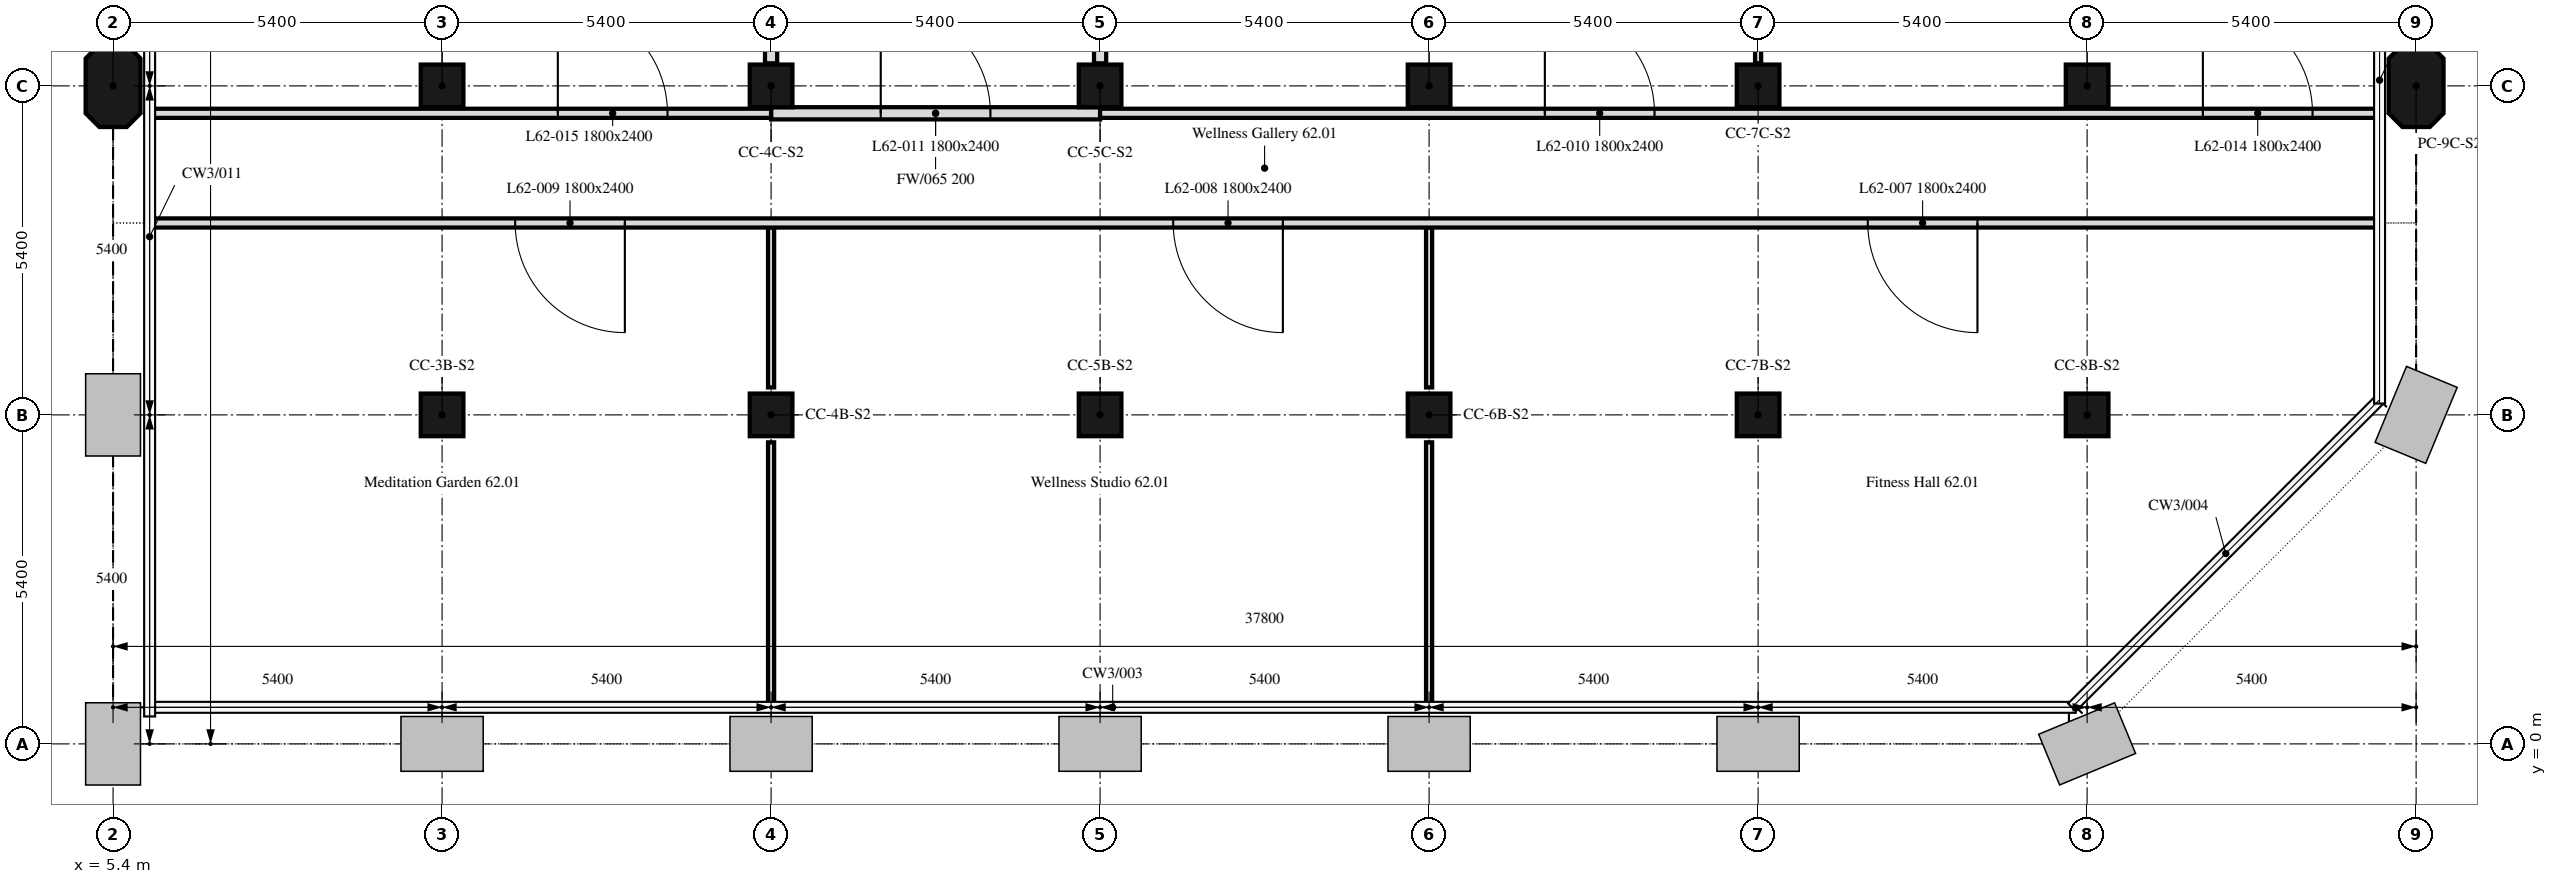
"""IFC4 building model, lengths in metres.
Left out: names, types, materials, properties, quantities, classifications, styles, units other than length and angle.
Written with IfcOpenShell. Run it as: python <this file> out.ifc"""

import sys

from ifc_helpers import new_model, si_unit, direction, frame, frame_2d, origin, origin_2d, place, context, subcontext, project, spatial, polyline, rectangle, outline, extrude, element, fill, save


model = new_model("IFC4")
c1 = context("Model", 3, precision=1e-05, world=origin(), true_north=direction((0.0, 1.0)))
c2 = subcontext(c1, "Body", "Model", "MODEL_VIEW")
j1 = project(units=[si_unit("LENGTHUNIT", "METRE"), si_unit("PLANEANGLEUNIT", "RADIAN")], contexts=[c1])
p1 = place(None, origin())
s1 = spatial("IfcSite", under=j1, at=p1, CompositionType="ELEMENT")
p2 = place(p1, origin())
s2 = spatial("IfcBuilding", under=s1, at=p2, CompositionType="ELEMENT")
p3 = place(p2, frame((0.0, 0.0, 255.7)))
s3 = spatial("IfcBuildingStorey", under=s2, at=p3, CompositionType="ELEMENT", Elevation=255.7)
for number, where, z_axis, x_axis in (
    (1, (10.8, 5.4, 0.0), (0.0, 0.0, 1.0), (1.0, 0.0, 0.0)),
    (2, (16.2, 5.4, 0.0), (0.0, 0.0, 1.0), (1.0, 0.0, 0.0)),
    (3, (21.6, 5.4, 0.0), (0.0, 0.0, 1.0), (1.0, 0.0, 0.0)),
    (4, (27.0, 5.4, 0.0), (0.0, 0.0, 1.0), (1.0, 0.0, 0.0)),
    (5, (32.4, 5.4, 0.0), (0.0, 0.0, 1.0), (1.0, 0.0, 0.0)),
    (6, (37.8, 5.4, 0.0), (0.0, 0.0, 1.0), (1.0, 0.0, 0.0)),
):
    element("IfcColumn", number, at=place(p3, frame(where, z_axis=z_axis, x_axis=x_axis)), inside=s3, PredefinedType="COLUMN", context=c2, shape_type="SweptSolid", body=[
        extrude(rectangle(XDim=0.7, YDim=0.7, at=origin_2d()), origin(), (0.0, 0.0, 1.0), 4.5),
    ])
p4 = place(p3, frame((5.4, 10.8, 0.0), z_axis=(0.0, 0.0, 1.0), x_axis=(0.0, 1.0, 0.0)))
e7 = element("IfcColumn", 7, at=p4, inside=s3, PredefinedType="COLUMN", context=c2, shape_type="SweptSolid", body=[
    extrude(outline(polyline([(-0.45, -0.45), (0.45, -0.45), (0.675, -0.225), (0.675, 0.225), (0.45, 0.45), (-0.45, 0.45), (-0.675, 0.225), (-0.675, -0.225), (-0.45, -0.45)])), origin(), (0.0, 0.0, 1.0), 4.5),
])
for number, where, z_axis, x_axis in (
    (8, (10.8, 10.8, 0.0), (0.0, 0.0, 1.0), (1.0, 0.0, 0.0)),
    (9, (16.2, 10.8, 0.0), (0.0, 0.0, 1.0), (1.0, 0.0, 0.0)),
    (10, (21.6, 10.8, 0.0), (0.0, 0.0, 1.0), (1.0, 0.0, 0.0)),
    (11, (27.0, 10.8, 0.0), (0.0, 0.0, 1.0), (1.0, 0.0, 0.0)),
    (12, (32.4, 10.8, 0.0), (0.0, 0.0, 1.0), (1.0, 0.0, 0.0)),
    (13, (37.8, 10.8, 0.0), (0.0, 0.0, 1.0), (1.0, 0.0, 0.0)),
):
    element("IfcColumn", number, at=place(p3, frame(where, z_axis=z_axis, x_axis=x_axis)), inside=s3, PredefinedType="COLUMN", context=c2, shape_type="SweptSolid", body=[
        extrude(rectangle(XDim=0.7, YDim=0.7, at=origin_2d()), origin(), (0.0, 0.0, 1.0), 4.5),
    ])
p5 = place(p3, frame((43.2, 10.8, 0.0), z_axis=(0.0, 0.0, 1.0), x_axis=(0.0, 1.0, 0.0)))
e14 = element("IfcColumn", 14, at=p5, inside=s3, PredefinedType="COLUMN", context=c2, shape_type="SweptSolid", body=[
    extrude(outline(polyline([(-0.45, -0.45), (0.45, -0.45), (0.675, -0.225), (0.675, 0.225), (0.45, 0.45), (-0.45, 0.45), (-0.675, 0.225), (-0.675, -0.225), (-0.45, -0.45)])), origin(), (0.0, 0.0, 1.0), 4.5),
])
p6 = place(p3, frame((27.0, 8.475, 0.0), z_axis=(0.0, 0.0, 1.0), x_axis=(0.0, -1.0, 0.0)))
e15 = element("IfcWall", 15, at=p6, inside=s3, PredefinedType="PARTITIONING", context=c2, shape_type="SweptSolid", body=[
    extrude(rectangle(XDim=2.625, YDim=0.1, at=frame_2d((1.312, 0.0))), origin(), (0.0, 0.0, 1.0), 3.75),
])
p7 = place(p3, frame((27.0, 4.949, 0.0), z_axis=(0.0, 0.0, 1.0), x_axis=(0.0, -1.0, 0.0)))
e16 = element("IfcWall", 16, at=p7, inside=s3, PredefinedType="PARTITIONING", context=c2, shape_type="SweptSolid", body=[
    extrude(rectangle(XDim=4.349, YDim=0.1, at=frame_2d((2.175, 0.0))), origin(), (0.0, 0.0, 1.0), 3.75),
])
p8 = place(p3, frame((16.2, 8.475, 0.0), z_axis=(0.0, 0.0, 1.0), x_axis=(0.0, -1.0, 0.0)))
e17 = element("IfcWall", 17, at=p8, inside=s3, PredefinedType="PARTITIONING", context=c2, shape_type="SweptSolid", body=[
    extrude(rectangle(XDim=2.625, YDim=0.1, at=frame_2d((1.312, 0.0))), origin(), (0.0, 0.0, 1.0), 3.75),
])
p9 = place(p3, frame((16.2, 4.949, 0.0), z_axis=(0.0, 0.0, 1.0), x_axis=(0.0, -1.0, 0.0)))
e18 = element("IfcWall", 18, at=p9, inside=s3, PredefinedType="PARTITIONING", context=c2, shape_type="SweptSolid", body=[
    extrude(rectangle(XDim=4.349, YDim=0.1, at=frame_2d((2.175, 0.0))), origin(), (0.0, 0.0, 1.0), 3.75),
])
p10 = place(p3, frame((42.6, 8.55, 0.0), z_axis=(0.0, 0.0, 1.0), x_axis=(-1.0, 0.0, 0.0)))
e19 = element("IfcWall", 19, at=p10, inside=s3, PredefinedType="PARTITIONING", context=c2, shape_type="SweptSolid", body=[
    extrude(rectangle(XDim=36.6, YDim=0.15, at=frame_2d((18.3, 0.0))), origin(), (0.0, 0.0, 1.0), 3.75),
])
p11 = place(p10, frame((6.6, 0.0, 0.0)))
e20 = element("IfcOpeningElement", 20, at=p11, cuts=e19, PredefinedType="OPENING", context=c2, shape_type="SweptSolid", body=[
    extrude(rectangle(XDim=1.8, YDim=2.4, at=frame_2d((0.9, 1.2))), frame((0.0, 0.075, 0.0), z_axis=(0.0, -1.0, 0.0), x_axis=(1.0, 0.0, 0.0)), (0.0, 0.0, 1.0), 0.15),
])
p12 = place(p10, frame((18.0, 0.0, 0.0)))
e21 = element("IfcOpeningElement", 21, at=p12, cuts=e19, PredefinedType="OPENING", context=c2, shape_type="SweptSolid", body=[
    extrude(rectangle(XDim=1.8, YDim=2.4, at=frame_2d((0.9, 1.2))), frame((0.0, 0.075, 0.0), z_axis=(0.0, -1.0, 0.0), x_axis=(1.0, 0.0, 0.0)), (0.0, 0.0, 1.0), 0.15),
])
p13 = place(p10, frame((28.8, 0.0, 0.0)))
e22 = element("IfcOpeningElement", 22, at=p13, cuts=e19, PredefinedType="OPENING", context=c2, shape_type="SweptSolid", body=[
    extrude(rectangle(XDim=1.8, YDim=2.4, at=frame_2d((0.9, 1.2))), frame((0.0, 0.075, 0.0), z_axis=(0.0, -1.0, 0.0), x_axis=(1.0, 0.0, 0.0)), (0.0, 0.0, 1.0), 0.15),
])
p14 = place(p3, frame((32.4, 11.17, 0.0), z_axis=(0.0, 0.0, 1.0), x_axis=(0.0, 1.0, 0.0)))
e23 = element("IfcWall", 23, at=p14, inside=s3, PredefinedType="PARTITIONING", context=c2, shape_type="SweptSolid", body=[
    extrude(rectangle(XDim=5.03, YDim=0.1, at=frame_2d((2.515, 0.0))), origin(), (0.0, 0.0, 1.0), 3.75),
])
p15 = place(p3, frame((21.6, 15.78, 0.0), z_axis=(0.0, 0.0, 1.0), x_axis=(0.0, -1.0, 0.0)))
e24 = element("IfcWall", 24, at=p15, inside=s3, PredefinedType="PARTITIONING", context=c2, shape_type="SweptSolid", body=[
    extrude(rectangle(XDim=4.61, YDim=0.2, at=frame_2d((2.305, 0.0))), origin(), (0.0, 0.0, 1.0), 3.75),
])
p16 = place(p3, frame((16.2, 10.35, 0.0), z_axis=(0.0, 0.0, 1.0), x_axis=(1.0, 0.0, 0.0)))
e25 = element("IfcWall", 25, at=p16, inside=s3, PredefinedType="PARTITIONING", context=c2, shape_type="SweptSolid", body=[
    extrude(rectangle(XDim=5.4, YDim=0.2, at=frame_2d((2.7, 0.0))), origin(), (0.0, 0.0, 1.0), 4.5),
])
p17 = place(p16, frame((1.8, 0.0, 0.0)))
e26 = element("IfcOpeningElement", 26, at=p17, cuts=e25, PredefinedType="OPENING", context=c2, shape_type="SweptSolid", body=[
    extrude(rectangle(XDim=1.8, YDim=2.4, at=frame_2d((0.9, 1.2))), frame((0.0, 0.1, 0.0), z_axis=(0.0, -1.0, 0.0), x_axis=(1.0, 0.0, 0.0)), (0.0, 0.0, 1.0), 0.2),
])
p18 = place(p3, frame((16.2, 16.2, 0.0), z_axis=(0.0, 0.0, 1.0), x_axis=(0.0, -1.0, 0.0)))
e27 = element("IfcWall", 27, at=p18, inside=s3, PredefinedType="PARTITIONING", context=c2, shape_type="SweptSolid", body=[
    extrude(rectangle(XDim=5.03, YDim=0.2, at=frame_2d((2.515, 0.0))), origin(), (0.0, 0.0, 1.0), 3.75),
])
p19 = place(p3, frame((21.6, 10.35, 0.0), z_axis=(0.0, 0.0, 1.0), x_axis=(1.0, 0.0, 0.0)))
e28 = element("IfcWall", 28, at=p19, inside=s3, PredefinedType="PARTITIONING", context=c2, shape_type="SweptSolid", body=[
    extrude(rectangle(XDim=21.0, YDim=0.15, at=frame_2d((10.5, 0.0))), origin(), (0.0, 0.0, 1.0), 3.75),
])
p20 = place(p19, frame((7.3, 0.0, 0.0)))
e29 = element("IfcOpeningElement", 29, at=p20, cuts=e28, PredefinedType="OPENING", context=c2, shape_type="SweptSolid", body=[
    extrude(rectangle(XDim=1.8, YDim=2.4, at=frame_2d((0.9, 1.2))), frame((0.0, 0.075, 0.0), z_axis=(0.0, -1.0, 0.0), x_axis=(1.0, 0.0, 0.0)), (0.0, 0.0, 1.0), 0.15),
])
p21 = place(p19, frame((18.1, 0.0, 0.0)))
e30 = element("IfcOpeningElement", 30, at=p21, cuts=e28, PredefinedType="OPENING", context=c2, shape_type="SweptSolid", body=[
    extrude(rectangle(XDim=1.8, YDim=2.4, at=frame_2d((0.9, 1.2))), frame((0.0, 0.075, 0.0), z_axis=(0.0, -1.0, 0.0), x_axis=(1.0, 0.0, 0.0)), (0.0, 0.0, 1.0), 0.15),
])
p22 = place(p3, frame((6.0, 10.35, 0.0), z_axis=(0.0, 0.0, 1.0), x_axis=(1.0, 0.0, 0.0)))
e31 = element("IfcWall", 31, at=p22, inside=s3, PredefinedType="PARTITIONING", context=c2, shape_type="SweptSolid", body=[
    extrude(rectangle(XDim=10.2, YDim=0.15, at=frame_2d((5.1, 0.0))), origin(), (0.0, 0.0, 1.0), 3.75),
])
p23 = place(p22, frame((6.7, 0.0, 0.0)))
e32 = element("IfcOpeningElement", 32, at=p23, cuts=e31, PredefinedType="OPENING", context=c2, shape_type="SweptSolid", body=[
    extrude(rectangle(XDim=1.8, YDim=2.4, at=frame_2d((0.9, 1.2))), frame((0.0, 0.075, 0.0), z_axis=(0.0, -1.0, 0.0), x_axis=(1.0, 0.0, 0.0)), (0.0, 0.0, 1.0), 0.15),
])
p24 = place(p11, origin())
e33 = element("IfcDoor", 33, at=p24, inside=s3, OperationType="DOUBLE_DOOR_SINGLE_SWING", PredefinedType="DOOR", context=c2, shape_type="SweptSolid", body=[
    extrude(rectangle(XDim=1.8, YDim=2.4, at=frame_2d((0.9, 1.2))), frame((0.0, 0.025, 0.0), z_axis=(0.0, -1.0, 0.0), x_axis=(1.0, 0.0, 0.0)), (0.0, 0.0, 1.0), 0.05),
])
fill(e20, e33)
p25 = place(p12, origin())
e34 = element("IfcDoor", 34, at=p25, inside=s3, OperationType="DOUBLE_DOOR_SINGLE_SWING", PredefinedType="DOOR", context=c2, shape_type="SweptSolid", body=[
    extrude(rectangle(XDim=1.8, YDim=2.4, at=frame_2d((0.9, 1.2))), frame((0.0, 0.025, 0.0), z_axis=(0.0, -1.0, 0.0), x_axis=(1.0, 0.0, 0.0)), (0.0, 0.0, 1.0), 0.05),
])
fill(e21, e34)
p26 = place(p13, origin())
e35 = element("IfcDoor", 35, at=p26, inside=s3, OperationType="DOUBLE_DOOR_SINGLE_SWING", PredefinedType="DOOR", context=c2, shape_type="SweptSolid", body=[
    extrude(rectangle(XDim=1.8, YDim=2.4, at=frame_2d((0.9, 1.2))), frame((0.0, 0.025, 0.0), z_axis=(0.0, -1.0, 0.0), x_axis=(1.0, 0.0, 0.0)), (0.0, 0.0, 1.0), 0.05),
])
fill(e22, e35)
p27 = place(p20, origin())
e36 = element("IfcDoor", 36, at=p27, inside=s3, OperationType="DOUBLE_DOOR_SINGLE_SWING", PredefinedType="DOOR", context=c2, shape_type="SweptSolid", body=[
    extrude(rectangle(XDim=1.8, YDim=2.4, at=frame_2d((0.9, 1.2))), frame((0.0, 0.025, 0.0), z_axis=(0.0, -1.0, 0.0), x_axis=(1.0, 0.0, 0.0)), (0.0, 0.0, 1.0), 0.05),
])
fill(e29, e36)
p28 = place(p17, origin())
e37 = element("IfcDoor", 37, at=p28, inside=s3, OperationType="DOUBLE_DOOR_SINGLE_SWING", PredefinedType="DOOR", context=c2, shape_type="SweptSolid", body=[
    extrude(rectangle(XDim=1.8, YDim=2.4, at=frame_2d((0.9, 1.2))), frame((0.0, 0.025, 0.0), z_axis=(0.0, -1.0, 0.0), x_axis=(1.0, 0.0, 0.0)), (0.0, 0.0, 1.0), 0.05),
])
fill(e26, e37)
p29 = place(p21, origin())
e38 = element("IfcDoor", 38, at=p29, inside=s3, OperationType="DOUBLE_DOOR_SINGLE_SWING", PredefinedType="DOOR", context=c2, shape_type="SweptSolid", body=[
    extrude(rectangle(XDim=1.8, YDim=2.4, at=frame_2d((0.9, 1.2))), frame((0.0, 0.025, 0.0), z_axis=(0.0, -1.0, 0.0), x_axis=(1.0, 0.0, 0.0)), (0.0, 0.0, 1.0), 0.05),
])
fill(e30, e38)
p30 = place(p23, origin())
e39 = element("IfcDoor", 39, at=p30, inside=s3, OperationType="DOUBLE_DOOR_SINGLE_SWING", PredefinedType="DOOR", context=c2, shape_type="SweptSolid", body=[
    extrude(rectangle(XDim=1.8, YDim=2.4, at=frame_2d((0.9, 1.2))), frame((0.0, 0.025, 0.0), z_axis=(0.0, -1.0, 0.0), x_axis=(1.0, 0.0, 0.0)), (0.0, 0.0, 1.0), 0.05),
])
fill(e32, e39)
save(model, sys.argv[1])
